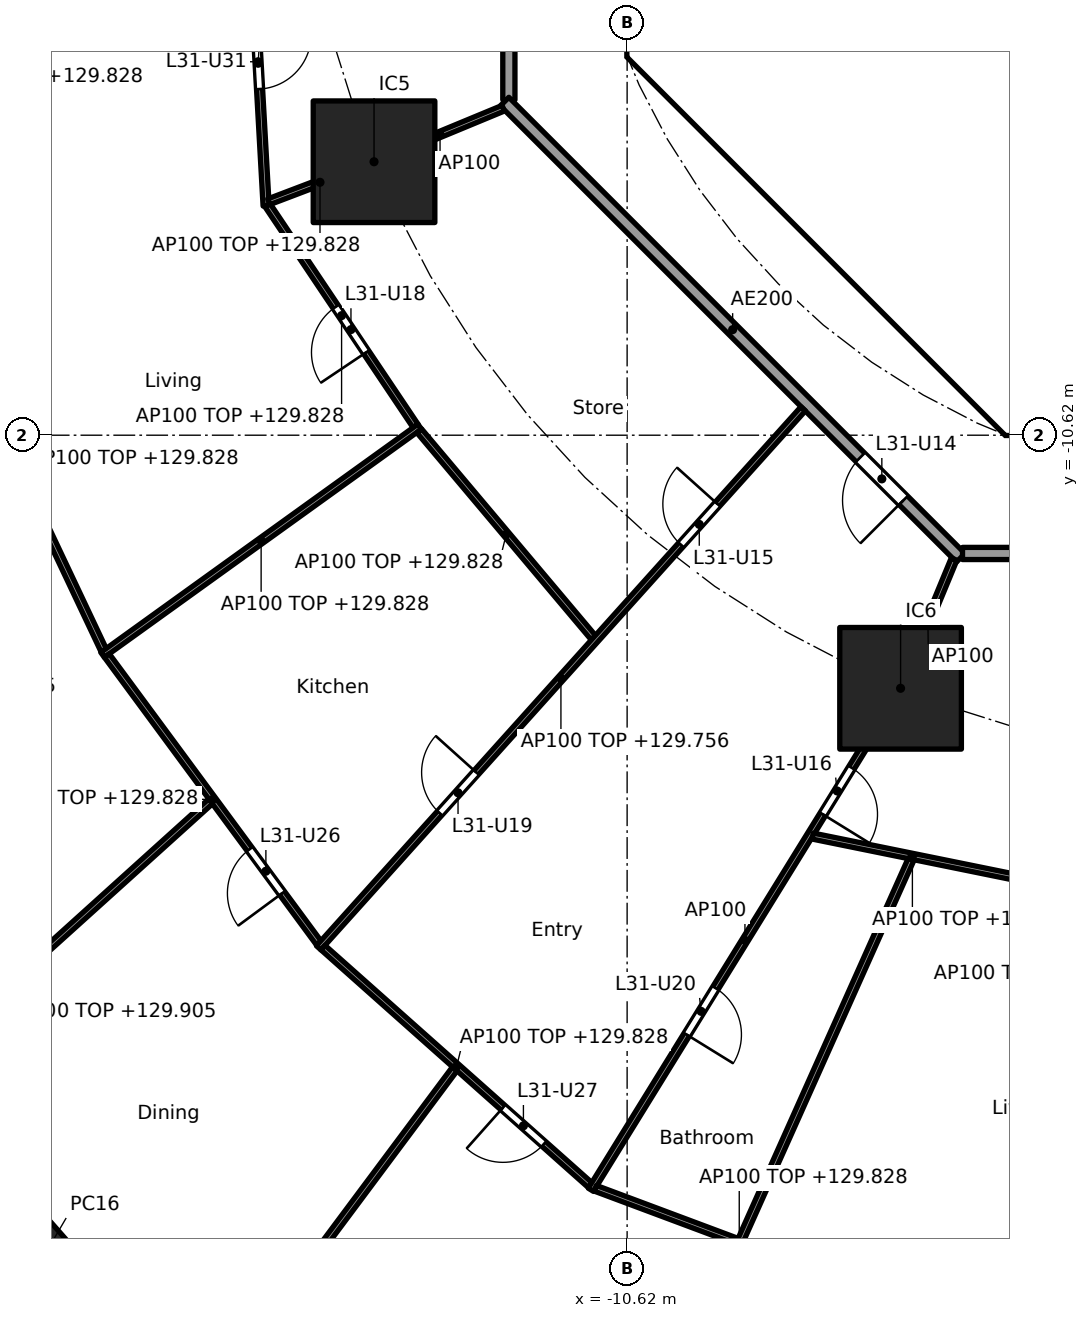
"""IFC4 building model, lengths in metres.
Left out: names, types, materials, properties, quantities, classifications, styles, units other than length and angle.
Written with IfcOpenShell. Run it as: python <this file> out.ifc"""

import sys

from ifc_helpers import new_model, si_unit, direction, frame, frame_2d, origin, origin_2d, place, context, subcontext, project, spatial, polyline, rectangle, hollow_rectangle, outline, extrude, element, fill, save


model = new_model("IFC4")
c1 = context("Model", 3, precision=1e-05, world=origin(), true_north=direction((0.0, 1.0)))
c2 = subcontext(c1, "Body", "Model", "MODEL_VIEW")
j1 = project(units=[si_unit("LENGTHUNIT", "METRE"), si_unit("PLANEANGLEUNIT", "RADIAN")], contexts=[c1])
p1 = place(None, origin())
s1 = spatial("IfcSite", under=j1, at=p1, CompositionType="ELEMENT")
p2 = place(p1, origin())
s2 = spatial("IfcBuilding", under=s1, at=p2, CompositionType="ELEMENT")
p3 = place(p2, frame((0.0, 0.0, 127.0)))
s3 = spatial("IfcBuildingStorey", under=s2, at=p3, CompositionType="ELEMENT", Elevation=127.0)
p4 = place(p3, frame((-20.209, -24.115, 0.0), z_axis=(0.0, 0.0, 1.0), x_axis=(0.660114607735, -0.751164898445, 0.0)))
e1 = element("IfcColumn", 1, at=p4, inside=s3, PredefinedType="COLUMN", context=c2, shape_type="SweptSolid", body=[
    extrude(hollow_rectangle(XDim=1.2, YDim=0.9, WallThickness=0.04, at=origin_2d()), origin(), (0.0, 0.0, 1.0), 3.7),
])
for number, where, z_axis, x_axis in (
    (2, (-14.782, -6.123, 0.0), (0.0, 0.0, 1.0), (1.0, 0.0, 0.0)),
    (3, (-6.123, -14.782, 0.0), (0.0, 0.0, 1.0), (1.0, 0.0, 0.0)),
):
    element("IfcColumn", number, at=place(p3, frame(where, z_axis=z_axis, x_axis=x_axis)), inside=s3, PredefinedType="COLUMN", context=c2, shape_type="SweptSolid", body=[
        extrude(rectangle(XDim=2.0, YDim=2.0, at=origin_2d()), origin(), (0.0, 0.0, 1.0), 3.7),
    ])
p5 = place(p3, frame((-9.988, -4.613, 0.0), z_axis=(0.0, 0.0, 1.0), x_axis=(0.707106781187, -0.707106781187, 0.0)))
e4 = element("IfcWall", 4, at=p5, inside=s3, PredefinedType="SHEAR", context=c2, shape_type="SweptSolid", body=[
    extrude(rectangle(XDim=7.602, YDim=0.6, at=frame_2d((3.801, 0.0))), origin(), (0.0, 0.0, 1.0), 3.44),
])
p6 = place(p5, frame((6.151, 0.0, 0.0)))
e5 = element("IfcOpeningElement", 5, at=p6, cuts=e4, PredefinedType="OPENING", context=c2, shape_type="SweptSolid", body=[
    extrude(rectangle(XDim=1.1, YDim=2.1, at=frame_2d((0.55, 1.05))), frame((0.0, 0.31, 0.0), z_axis=(0.0, -1.0, 0.0), x_axis=(1.0, 0.0, 0.0)), (0.0, 0.0, 1.0), 0.62),
])
p7 = place(p3, frame((-6.2, -7.827, 0.0), z_axis=(0.0, 0.0, 1.0), x_axis=(0.0, 1.0, 0.0)))
e6 = element("IfcWall", 6, at=p7, inside=s3, PredefinedType="PARTITIONING", context=c2, shape_type="SweptSolid", body=[
    extrude(rectangle(XDim=3.527, YDim=0.15, at=frame_2d((1.763, 0.0))), origin(), (0.0, 0.0, 1.0), 3.44),
])
p8 = place(p7, frame((2.365, 0.0, 0.0)))
e7 = element("IfcOpeningElement", 7, at=p8, cuts=e6, PredefinedType="OPENING", context=c2, shape_type="SweptSolid", body=[
    extrude(rectangle(XDim=0.9, YDim=2.1, at=frame_2d((0.45, 1.05))), frame((0.0, 0.085, 0.0), z_axis=(0.0, -1.0, 0.0), x_axis=(1.0, 0.0, 0.0)), (0.0, 0.0, 1.0), 0.17),
])
p9 = place(p7, frame((0.489, 0.0, 0.0)))
e8 = element("IfcOpeningElement", 8, at=p9, cuts=e6, PredefinedType="OPENING", context=c2, shape_type="SweptSolid", body=[
    extrude(rectangle(XDim=0.9, YDim=2.1, at=frame_2d((0.45, 1.05))), frame((0.0, 0.085, 0.0), z_axis=(0.0, -1.0, 0.0), x_axis=(1.0, 0.0, 0.0)), (0.0, 0.0, 1.0), 0.17),
])
p10 = place(p3, origin())
e9 = element("IfcWall", 9, at=p10, inside=s3, PredefinedType="SHEAR", context=c2, shape_type="SweptSolid", body=[
    extrude(outline(polyline([(-10.625, -3.801), (-10.025, -3.801), (-10.025, -4.152), (-9.776, -4.401), (-10.2, -4.825), (-10.625, -4.401), (-10.625, -3.801)])), origin(), (0.0, 0.0, 1.0), 3.44),
])
p11 = place(p3, origin())
e10 = element("IfcWall", 10, at=p11, inside=s3, PredefinedType="SHEAR", context=c2, shape_type="SweptSolid", body=[
    extrude(outline(polyline([(-4.152, -10.025), (4.152, -10.025), (4.401, -9.776), (4.825, -10.2), (4.401, -10.625), (-4.401, -10.625), (-4.825, -10.2), (-4.401, -9.776), (-4.152, -10.025)])), origin(), (0.0, 0.0, 1.0), 3.44),
])
p12 = place(p3, frame((-8.301, -5.8, 0.0), z_axis=(0.0, 0.0, 1.0), x_axis=(1.0, 0.0, 0.0)))
e11 = element("IfcWall", 11, at=p12, inside=s3, PredefinedType="PARTITIONING", context=c2, shape_type="SweptSolid", body=[
    extrude(rectangle(XDim=2.026, YDim=0.15, at=frame_2d((1.013, 0.0))), origin(), (0.0, 0.0, 1.0), 3.44),
])
p13 = place(p3, frame((-12.565, 5.304, 0.0), z_axis=(0.0, 0.0, 1.0), x_axis=(0.0, -1.0, 0.0)))
e12 = element("IfcWall", 12, at=p13, inside=s3, PredefinedType="PARTITIONING", context=c2, shape_type="SweptSolid", body=[
    extrude(rectangle(XDim=10.409, YDim=0.2, at=frame_2d((5.205, 0.0))), origin(), (0.0, 0.0, 1.0), 3.44),
])
p14 = place(p3, frame((-12.635, -5.134, 0.0), z_axis=(0.0, 0.0, 1.0), x_axis=(0.707106781187, -0.707106781187, 0.0)))
e13 = element("IfcWall", 13, at=p14, inside=s3, PredefinedType="PARTITIONING", context=c2, shape_type="SweptSolid", body=[
    extrude(rectangle(XDim=10.609, YDim=0.2, at=frame_2d((5.305, 0.0))), origin(), (0.0, 0.0, 1.0), 3.44),
])
p15 = place(p14, frame((8.274, 0.0, 0.0)))
e14 = element("IfcOpeningElement", 14, at=p15, cuts=e13, PredefinedType="OPENING", context=c2, shape_type="SweptSolid", body=[
    extrude(rectangle(XDim=1.0, YDim=2.1, at=frame_2d((0.5, 1.05))), frame((0.0, 0.11, 0.0), z_axis=(0.0, -1.0, 0.0), x_axis=(1.0, 0.0, 0.0)), (0.0, 0.0, 1.0), 0.22),
])
p16 = place(p3, frame((-5.104, -12.565, 0.0), z_axis=(0.0, 0.0, 1.0), x_axis=(1.0, 0.0, 0.0)))
e15 = element("IfcWall", 15, at=p16, inside=s3, PredefinedType="PARTITIONING", context=c2, shape_type="SweptSolid", body=[
    extrude(rectangle(XDim=10.409, YDim=0.2, at=frame_2d((5.205, 0.0))), origin(), (0.0, 0.0, 1.0), 3.44),
])
p17 = place(p3, frame((-16.82, -2.158, 0.0), z_axis=(0.0, 0.0, 1.0), x_axis=(0.055967931845, -0.998432566879, 0.0)))
e16 = element("IfcWall", 16, at=p17, inside=s3, PredefinedType="PARTITIONING", context=c2, shape_type="SweptSolid", body=[
    extrude(rectangle(XDim=4.698, YDim=0.1, at=frame_2d((2.349, 0.0))), origin(), (0.0, 0.0, 1.0), 2.828),
])
p18 = place(p17, frame((1.874, 0.0, 0.0)))
e17 = element("IfcOpeningElement", 17, at=p18, cuts=e16, PredefinedType="OPENING", context=c2, shape_type="SweptSolid", body=[
    extrude(rectangle(XDim=0.9, YDim=2.1, at=frame_2d((0.45, 1.05))), frame((0.0, 0.06, 0.0), z_axis=(0.0, -1.0, 0.0), x_axis=(1.0, 0.0, 0.0)), (0.0, 0.0, 1.0), 0.12),
])
p19 = place(p3, frame((-12.657, -5.243, 0.0), z_axis=(0.0, 0.0, 1.0), x_axis=(-0.923864733477, -0.382719158442, 0.0)))
e18 = element("IfcWall", 18, at=p19, inside=s3, PredefinedType="PARTITIONING", context=c2, shape_type="SweptSolid", body=[
    extrude(rectangle(XDim=2.25, YDim=0.1, at=frame_2d((1.125, 0.0))), origin(), (0.0, 0.0, 1.0), 3.44),
])
p20 = place(p3, frame((-14.829, -6.141, 0.0), z_axis=(0.0, 0.0, 1.0), x_axis=(-0.934704367514, -0.355426146128, 0.0)))
e19 = element("IfcWall", 19, at=p20, inside=s3, PredefinedType="PARTITIONING", context=c2, shape_type="SweptSolid", body=[
    extrude(rectangle(XDim=1.802, YDim=0.1, at=frame_2d((0.901, 0.0))), origin(), (0.0, 0.0, 1.0), 2.828),
])
p21 = place(p3, frame((-16.532, -6.84, 0.0), z_axis=(0.0, 0.0, 1.0), x_axis=(0.556994773624, -0.830515997531, 0.0)))
e20 = element("IfcWall", 20, at=p21, inside=s3, PredefinedType="PARTITIONING", context=c2, shape_type="SweptSolid", body=[
    extrude(rectangle(XDim=4.366, YDim=0.1, at=frame_2d((2.183, 0.0))), origin(), (0.0, 0.0, 1.0), 2.828),
])
p22 = place(p21, frame((2.01, 0.0, 0.0)))
e21 = element("IfcOpeningElement", 21, at=p22, cuts=e20, PredefinedType="OPENING", context=c2, shape_type="SweptSolid", body=[
    extrude(rectangle(XDim=0.9, YDim=2.1, at=frame_2d((0.45, 1.05))), frame((0.0, 0.06, 0.0), z_axis=(0.0, -1.0, 0.0), x_axis=(1.0, 0.0, 0.0)), (0.0, 0.0, 1.0), 0.12),
])
p23 = place(p3, frame((-21.75, -8.826, 0.0), z_axis=(0.0, 0.0, 1.0), x_axis=(0.427739388908, -0.903902104863, 0.0)))
e22 = element("IfcWall", 22, at=p23, inside=s3, PredefinedType="PARTITIONING", context=c2, shape_type="SweptSolid", body=[
    extrude(rectangle(XDim=5.899, YDim=0.1, at=frame_2d((2.949, 0.0))), origin(), (0.0, 0.0, 1.0), 2.828),
])
p24 = place(p3, frame((-14.031, -10.479, 0.0), z_axis=(0.0, 0.0, 1.0), x_axis=(-0.811653955345, -0.584138559567, 0.0)))
e23 = element("IfcWall", 23, at=p24, inside=s3, PredefinedType="PARTITIONING", context=c2, shape_type="SweptSolid", body=[
    extrude(rectangle(XDim=6.426, YDim=0.1, at=frame_2d((3.213, 0.0))), origin(), (0.0, 0.0, 1.0), 2.828),
])
p25 = place(p3, frame((-14.04, -10.547, 0.0), z_axis=(0.0, 0.0, 1.0), x_axis=(0.644036028289, -0.764995159635, 0.0)))
e24 = element("IfcWall", 24, at=p25, inside=s3, PredefinedType="PARTITIONING", context=c2, shape_type="SweptSolid", body=[
    extrude(rectangle(XDim=4.448, YDim=0.1, at=frame_2d((2.224, 0.0))), origin(), (0.0, 0.0, 1.0), 2.828),
])
p26 = place(p3, frame((-19.176, -14.244, 0.0), z_axis=(0.0, 0.0, 1.0), x_axis=(0.593532053206, -0.80481035146, 0.0)))
e25 = element("IfcWall", 25, at=p26, inside=s3, PredefinedType="PARTITIONING", context=c2, shape_type="SweptSolid", body=[
    extrude(rectangle(XDim=5.876, YDim=0.1, at=frame_2d((2.938, 0.0))), origin(), (0.0, 0.0, 1.0), 2.828),
])
p27 = place(p26, frame((3.957, 0.0, 0.0)))
e26 = element("IfcOpeningElement", 26, at=p27, cuts=e25, PredefinedType="OPENING", context=c2, shape_type="SweptSolid", body=[
    extrude(rectangle(XDim=0.9, YDim=2.1, at=frame_2d((0.45, 1.05))), frame((0.0, 0.06, 0.0), z_axis=(0.0, -1.0, 0.0), x_axis=(1.0, 0.0, 0.0)), (0.0, 0.0, 1.0), 0.12),
])
p28 = place(p3, frame((-17.47, -16.642, 0.0), z_axis=(0.0, 0.0, 1.0), x_axis=(-0.742345465337, -0.670017320742, 0.0)))
e27 = element("IfcWall", 27, at=p28, inside=s3, PredefinedType="PARTITIONING", context=c2, shape_type="SweptSolid", body=[
    extrude(rectangle(XDim=7.21, YDim=0.1, at=frame_2d((3.605, 0.0))), origin(), (0.0, 0.0, 1.0), 2.905),
])
p29 = place(p3, frame((-7.725, -10.186, 0.0), z_axis=(0.0, 0.0, 1.0), x_axis=(-0.668498346565, -0.743713628112, 0.0)))
e28 = element("IfcWall", 28, at=p29, inside=s3, PredefinedType="PARTITIONING", context=c2, shape_type="SweptSolid", body=[
    extrude(rectangle(XDim=11.919, YDim=0.1, at=frame_2d((5.959, 0.0))), origin(), (0.0, 0.0, 1.0), 2.756),
])
p30 = place(p29, frame((2.106, 0.0, 0.0)))
e29 = element("IfcOpeningElement", 29, at=p30, cuts=e28, PredefinedType="OPENING", context=c2, shape_type="SweptSolid", body=[
    extrude(rectangle(XDim=0.9, YDim=2.1, at=frame_2d((0.45, 1.05))), frame((0.0, 0.06, 0.0), z_axis=(0.0, -1.0, 0.0), x_axis=(1.0, 0.0, 0.0)), (0.0, 0.0, 1.0), 0.12),
])
p31 = place(p29, frame((8.041, 0.0, 0.0)))
e30 = element("IfcOpeningElement", 30, at=p31, cuts=e28, PredefinedType="OPENING", context=c2, shape_type="SweptSolid", body=[
    extrude(rectangle(XDim=0.9, YDim=2.1, at=frame_2d((0.45, 1.05))), frame((0.0, 0.06, 0.0), z_axis=(0.0, -1.0, 0.0), x_axis=(1.0, 0.0, 0.0)), (0.0, 0.0, 1.0), 0.12),
])
p32 = place(p3, frame((-15.622, -19.046, 0.0), z_axis=(0.0, 0.0, 1.0), x_axis=(0.747342891849, -0.664438561496, 0.0)))
e31 = element("IfcWall", 31, at=p32, inside=s3, PredefinedType="PARTITIONING", context=c2, shape_type="SweptSolid", body=[
    extrude(rectangle(XDim=5.881, YDim=0.1, at=frame_2d((2.94, 0.0))), origin(), (0.0, 0.0, 1.0), 2.828),
])
p33 = place(p32, frame((3.961, 0.0, 0.0)))
e32 = element("IfcOpeningElement", 32, at=p33, cuts=e31, PredefinedType="OPENING", context=c2, shape_type="SweptSolid", body=[
    extrude(rectangle(XDim=0.9, YDim=2.1, at=frame_2d((0.45, 1.05))), frame((0.0, 0.06, 0.0), z_axis=(0.0, -1.0, 0.0), x_axis=(1.0, 0.0, 0.0)), (0.0, 0.0, 1.0), 0.12),
])
p34 = place(p3, frame((-13.454, -21.04, 0.0), z_axis=(0.0, 0.0, 1.0), x_axis=(-0.597848033124, -0.801609461826, 0.0)))
e33 = element("IfcWall", 33, at=p34, inside=s3, PredefinedType="PARTITIONING", context=c2, shape_type="SweptSolid", body=[
    extrude(rectangle(XDim=7.486, YDim=0.1, at=frame_2d((3.743, 0.0))), origin(), (0.0, 0.0, 1.0), 2.905),
])
p35 = place(p3, frame((-5.243, -12.657, 0.0), z_axis=(0.0, 0.0, 1.0), x_axis=(-0.382811769845, -0.923826362943, 0.0)))
e34 = element("IfcWall", 34, at=p35, inside=s3, PredefinedType="PARTITIONING", context=c2, shape_type="SweptSolid", body=[
    extrude(rectangle(XDim=2.25, YDim=0.1, at=frame_2d((1.125, 0.0))), origin(), (0.0, 0.0, 1.0), 3.44),
])
p36 = place(p3, frame((-6.149, -14.825, 0.0), z_axis=(0.0, 0.0, 1.0), x_axis=(-0.525396393596, -0.850857584791, 0.0)))
e35 = element("IfcWall", 35, at=p36, inside=s3, PredefinedType="PARTITIONING", context=c2, shape_type="SweptSolid", body=[
    extrude(rectangle(XDim=9.643, YDim=0.1, at=frame_2d((4.822, 0.0))), origin(), (0.0, 0.0, 1.0), 3.44),
])
p37 = place(p36, frame((1.485, 0.0, 0.0)))
e36 = element("IfcOpeningElement", 36, at=p37, cuts=e35, PredefinedType="OPENING", context=c2, shape_type="SweptSolid", body=[
    extrude(rectangle(XDim=0.9, YDim=2.1, at=frame_2d((0.45, 1.05))), frame((0.0, 0.06, 0.0), z_axis=(0.0, -1.0, 0.0), x_axis=(1.0, 0.0, 0.0)), (0.0, 0.0, 1.0), 0.12),
])
p38 = place(p36, frame((5.744, 0.0, 0.0)))
e37 = element("IfcOpeningElement", 37, at=p38, cuts=e35, PredefinedType="OPENING", context=c2, shape_type="SweptSolid", body=[
    extrude(rectangle(XDim=0.9, YDim=2.1, at=frame_2d((0.45, 1.05))), frame((0.0, 0.06, 0.0), z_axis=(0.0, -1.0, 0.0), x_axis=(1.0, 0.0, 0.0)), (0.0, 0.0, 1.0), 0.12),
])
p39 = place(p3, frame((-7.568, -17.212, 0.0), z_axis=(0.0, 0.0, 1.0), x_axis=(0.979967079473, -0.199159541946, 0.0)))
e38 = element("IfcWall", 38, at=p39, inside=s3, PredefinedType="PARTITIONING", context=c2, shape_type="SweptSolid", body=[
    extrude(rectangle(XDim=3.347, YDim=0.1, at=frame_2d((1.673, 0.0))), origin(), (0.0, 0.0, 1.0), 2.828),
])
p40 = place(p3, frame((-11.143, -23.004, 0.0), z_axis=(0.0, 0.0, 1.0), x_axis=(0.936721765635, -0.350074754567, 0.0)))
e39 = element("IfcWall", 39, at=p40, inside=s3, PredefinedType="PARTITIONING", context=c2, shape_type="SweptSolid", body=[
    extrude(rectangle(XDim=5.053, YDim=0.1, at=frame_2d((2.526, 0.0))), origin(), (0.0, 0.0, 1.0), 2.828),
])
p41 = place(p3, frame((-5.949, -17.591, 0.0), z_axis=(0.0, 0.0, 1.0), x_axis=(-0.40838467696, -0.912809923053, 0.0)))
e40 = element("IfcWall", 40, at=p41, inside=s3, PredefinedType="PARTITIONING", context=c2, shape_type="SweptSolid", body=[
    extrude(rectangle(XDim=14.665, YDim=0.1, at=frame_2d((7.333, 0.0))), origin(), (0.0, 0.0, 1.0), 2.905),
])
p42 = place(p41, frame((10.334, 0.0, 0.0)))
e41 = element("IfcOpeningElement", 41, at=p42, cuts=e40, PredefinedType="OPENING", context=c2, shape_type="SweptSolid", body=[
    extrude(rectangle(XDim=0.9, YDim=2.1, at=frame_2d((0.45, 1.05))), frame((0.0, 0.06, 0.0), z_axis=(0.0, -1.0, 0.0), x_axis=(1.0, 0.0, 0.0)), (0.0, 0.0, 1.0), 0.12),
])
p43 = place(p8, origin())
e42 = element("IfcDoor", 42, at=p43, inside=s3, OperationType="SINGLE_SWING_RIGHT", PredefinedType="DOOR", context=c2, shape_type="SweptSolid", body=[
    extrude(rectangle(XDim=0.9, YDim=2.1, at=frame_2d((0.45, 1.05))), frame((0.0, 0.025, 0.0), z_axis=(0.0, -1.0, 0.0), x_axis=(1.0, 0.0, 0.0)), (0.0, 0.0, 1.0), 0.05),
])
fill(e7, e42)
p44 = place(p9, origin())
e43 = element("IfcDoor", 43, at=p44, inside=s3, OperationType="SINGLE_SWING_RIGHT", PredefinedType="DOOR", context=c2, shape_type="SweptSolid", body=[
    extrude(rectangle(XDim=0.9, YDim=2.1, at=frame_2d((0.45, 1.05))), frame((0.0, 0.025, 0.0), z_axis=(0.0, -1.0, 0.0), x_axis=(1.0, 0.0, 0.0)), (0.0, 0.0, 1.0), 0.05),
])
fill(e8, e43)
p45 = place(p6, origin())
e44 = element("IfcDoor", 44, at=p45, inside=s3, OperationType="SINGLE_SWING_RIGHT", PredefinedType="DOOR", context=c2, shape_type="SweptSolid", body=[
    extrude(rectangle(XDim=1.1, YDim=2.1, at=frame_2d((0.55, 1.05))), frame((0.0, 0.025, 0.0), z_axis=(0.0, -1.0, 0.0), x_axis=(1.0, 0.0, 0.0)), (0.0, 0.0, 1.0), 0.05),
])
fill(e5, e44)
p46 = place(p15, frame((1.0, 0.0, 0.0), x_axis=(-1.0, 0.0, 0.0)))
e45 = element("IfcDoor", 45, at=p46, inside=s3, OperationType="SINGLE_SWING_LEFT", PredefinedType="DOOR", context=c2, shape_type="SweptSolid", body=[
    extrude(rectangle(XDim=1.0, YDim=2.1, at=frame_2d((0.5, 1.05))), frame((0.0, 0.025, 0.0), z_axis=(0.0, -1.0, 0.0), x_axis=(1.0, 0.0, 0.0)), (0.0, 0.0, 1.0), 0.05),
])
fill(e14, e45)
p47 = place(p30, frame((0.9, 0.0, 0.0), x_axis=(-1.0, 0.0, 0.0)))
e46 = element("IfcDoor", 46, at=p47, inside=s3, OperationType="SINGLE_SWING_RIGHT", PredefinedType="DOOR", context=c2, shape_type="SweptSolid", body=[
    extrude(rectangle(XDim=0.9, YDim=2.1, at=frame_2d((0.45, 1.05))), frame((0.0, 0.025, 0.0), z_axis=(0.0, -1.0, 0.0), x_axis=(1.0, 0.0, 0.0)), (0.0, 0.0, 1.0), 0.05),
])
fill(e29, e46)
p48 = place(p37, origin())
e47 = element("IfcDoor", 47, at=p48, inside=s3, OperationType="SINGLE_SWING_RIGHT", PredefinedType="DOOR", context=c2, shape_type="SweptSolid", body=[
    extrude(rectangle(XDim=0.9, YDim=2.1, at=frame_2d((0.45, 1.05))), frame((0.0, 0.025, 0.0), z_axis=(0.0, -1.0, 0.0), x_axis=(1.0, 0.0, 0.0)), (0.0, 0.0, 1.0), 0.05),
])
fill(e36, e47)
p49 = place(p22, frame((0.9, 0.0, 0.0), x_axis=(-1.0, 0.0, 0.0)))
e48 = element("IfcDoor", 48, at=p49, inside=s3, OperationType="SINGLE_SWING_LEFT", PredefinedType="DOOR", context=c2, shape_type="SweptSolid", body=[
    extrude(rectangle(XDim=0.9, YDim=2.1, at=frame_2d((0.45, 1.05))), frame((0.0, 0.025, 0.0), z_axis=(0.0, -1.0, 0.0), x_axis=(1.0, 0.0, 0.0)), (0.0, 0.0, 1.0), 0.05),
])
fill(e21, e48)
p50 = place(p31, frame((0.9, 0.0, 0.0), x_axis=(-1.0, 0.0, 0.0)))
e49 = element("IfcDoor", 49, at=p50, inside=s3, OperationType="SINGLE_SWING_RIGHT", PredefinedType="DOOR", context=c2, shape_type="SweptSolid", body=[
    extrude(rectangle(XDim=0.9, YDim=2.1, at=frame_2d((0.45, 1.05))), frame((0.0, 0.025, 0.0), z_axis=(0.0, -1.0, 0.0), x_axis=(1.0, 0.0, 0.0)), (0.0, 0.0, 1.0), 0.05),
])
fill(e30, e49)
p51 = place(p38, origin())
e50 = element("IfcDoor", 50, at=p51, inside=s3, OperationType="SINGLE_SWING_RIGHT", PredefinedType="DOOR", context=c2, shape_type="SweptSolid", body=[
    extrude(rectangle(XDim=0.9, YDim=2.1, at=frame_2d((0.45, 1.05))), frame((0.0, 0.025, 0.0), z_axis=(0.0, -1.0, 0.0), x_axis=(1.0, 0.0, 0.0)), (0.0, 0.0, 1.0), 0.05),
])
fill(e37, e50)
p52 = place(p27, frame((0.9, 0.0, 0.0), x_axis=(-1.0, 0.0, 0.0)))
e51 = element("IfcDoor", 51, at=p52, inside=s3, OperationType="SINGLE_SWING_LEFT", PredefinedType="DOOR", context=c2, shape_type="SweptSolid", body=[
    extrude(rectangle(XDim=0.9, YDim=2.1, at=frame_2d((0.45, 1.05))), frame((0.0, 0.025, 0.0), z_axis=(0.0, -1.0, 0.0), x_axis=(1.0, 0.0, 0.0)), (0.0, 0.0, 1.0), 0.05),
])
fill(e26, e51)
p53 = place(p33, frame((0.9, 0.0, 0.0), x_axis=(-1.0, 0.0, 0.0)))
e52 = element("IfcDoor", 52, at=p53, inside=s3, OperationType="SINGLE_SWING_RIGHT", PredefinedType="DOOR", context=c2, shape_type="SweptSolid", body=[
    extrude(rectangle(XDim=0.9, YDim=2.1, at=frame_2d((0.45, 1.05))), frame((0.0, 0.025, 0.0), z_axis=(0.0, -1.0, 0.0), x_axis=(1.0, 0.0, 0.0)), (0.0, 0.0, 1.0), 0.05),
])
fill(e32, e52)
p54 = place(p18, origin())
e53 = element("IfcDoor", 53, at=p54, inside=s3, OperationType="SINGLE_SWING_LEFT", PredefinedType="DOOR", context=c2, shape_type="SweptSolid", body=[
    extrude(rectangle(XDim=0.9, YDim=2.1, at=frame_2d((0.45, 1.05))), frame((0.0, 0.025, 0.0), z_axis=(0.0, -1.0, 0.0), x_axis=(1.0, 0.0, 0.0)), (0.0, 0.0, 1.0), 0.05),
])
fill(e17, e53)
save(model, sys.argv[1])
